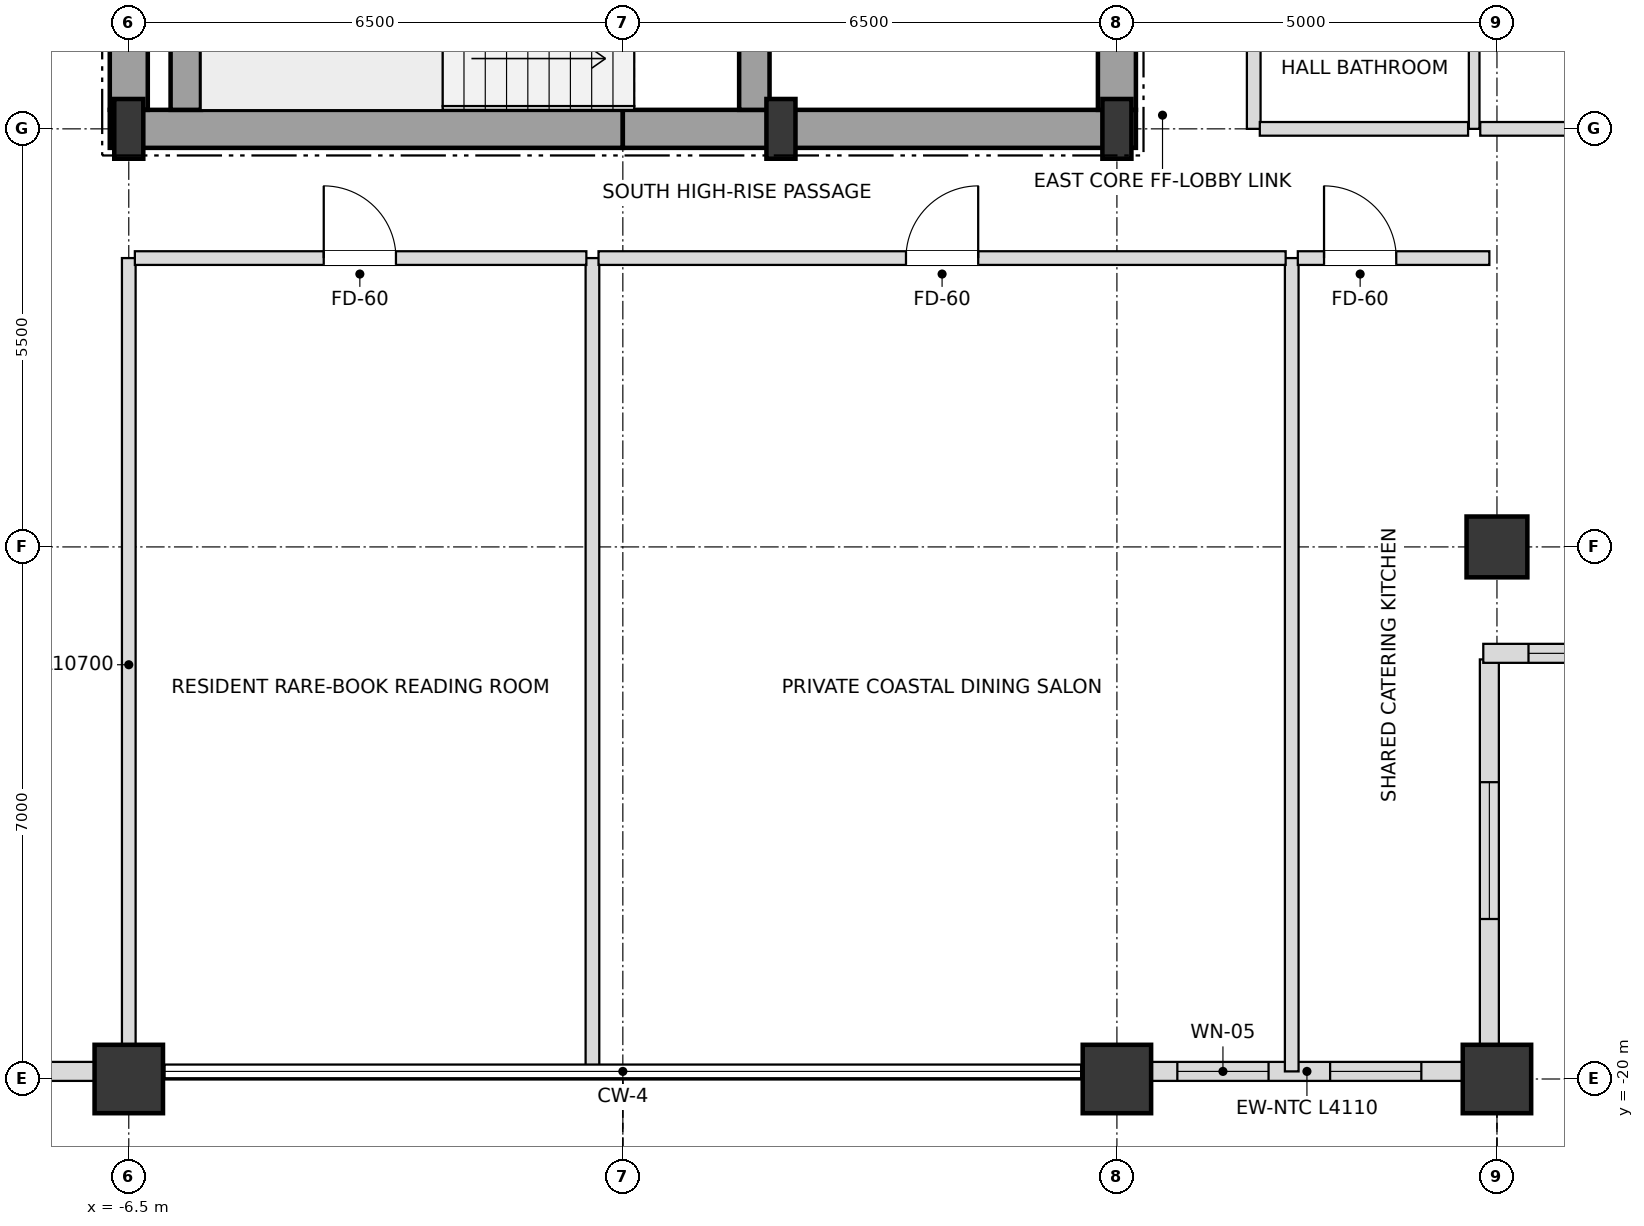
"""IFC4 building model, lengths in metres.
Left out: names, types, materials, properties, quantities, classifications, styles, units other than length and angle.
Written with IfcOpenShell. Run it as: python <this file> out.ifc"""

import sys

from ifc_helpers import new_model, si_unit, direction, frame, frame_2d, origin, origin_2d, place, context, subcontext, project, spatial, rectangle, i_section, extrude, element, fill, save


model = new_model("IFC4")
c1 = context("Model", 3, precision=1e-05, world=origin(), true_north=direction((0.0, 1.0)))
c2 = subcontext(c1, "Body", "Model", "MODEL_VIEW")
j1 = project(units=[si_unit("LENGTHUNIT", "METRE"), si_unit("PLANEANGLEUNIT", "RADIAN")], contexts=[c1])
p1 = place(None, origin())
s1 = spatial("IfcSite", under=j1, at=p1, CompositionType="ELEMENT")
p2 = place(p1, origin())
s2 = spatial("IfcBuilding", under=s1, at=p2, CompositionType="ELEMENT")
p3 = place(p2, frame((0.0, 0.0, 283.5)))
s3 = spatial("IfcBuildingStorey", under=s2, at=p3, CompositionType="ELEMENT", Elevation=283.5)
for number, where, z_axis, x_axis in (
    (1, (-6.5, -7.5, 0.0), (0.0, 0.0, 1.0), (1.0, 0.0, 0.0)),
    (2, (2.08, -7.5, 0.0), (0.0, 0.0, 1.0), (1.0, 0.0, 0.0)),
    (3, (6.5, -7.5, 0.0), (0.0, 0.0, 1.0), (1.0, 0.0, 0.0)),
):
    element("IfcColumn", number, at=place(p3, frame(where, z_axis=z_axis, x_axis=x_axis)), inside=s3, PredefinedType="COLUMN", context=c2, shape_type="SweptSolid", body=[
        extrude(i_section(OverallWidth=0.382, OverallDepth=0.786, WebThickness=0.02, FlangeThickness=0.033, at=origin_2d()), origin(), (0.0, 0.0, 1.0), 3.6),
    ])
for number, where, z_axis, x_axis in (
    (4, (-6.5, -20.0, 0.0), (0.0, 0.0, 1.0), (1.0, 0.0, 0.0)),
    (5, (6.5, -20.0, 0.0), (0.0, 0.0, 1.0), (1.0, 0.0, 0.0)),
    (6, (11.5, -20.0, 0.0), (0.0, 0.0, 1.0), (1.0, 0.0, 0.0)),
):
    element("IfcColumn", number, at=place(p3, frame(where, z_axis=z_axis, x_axis=x_axis)), inside=s3, PredefinedType="USERDEFINED", context=c2, shape_type="SweptSolid", body=[
        extrude(rectangle(XDim=0.9, YDim=0.9, at=origin_2d()), origin(), (0.0, 0.0, 1.0), 3.6),
    ])
p4 = place(p3, frame((11.5, -13.0, 0.0), z_axis=(0.0, 0.0, 1.0), x_axis=(1.0, 0.0, 0.0)))
e7 = element("IfcColumn", 7, at=p4, inside=s3, PredefinedType="COLUMN", context=c2, shape_type="SweptSolid", body=[
    extrude(rectangle(XDim=0.8, YDim=0.8, at=origin_2d()), origin(), (0.0, 0.0, 1.0), 3.6),
])
p5 = place(p3, frame((-11.055, -19.9, 0.0), z_axis=(0.0, 0.0, 1.0), x_axis=(1.0, 0.0, 0.0)))
e8 = element("IfcWall", 8, at=p5, inside=s3, PredefinedType="SOLIDWALL", context=c2, shape_type="SweptSolid", body=[
    extrude(rectangle(XDim=4.11, YDim=0.25, at=frame_2d((2.055, 0.0))), origin(), (0.0, 0.0, 1.0), 2.748),
])
p6 = place(p5, frame((1.155, 0.0, 0.72)))
e9 = element("IfcOpeningElement", 9, at=p6, cuts=e8, PredefinedType="OPENING", context=c2, shape_type="SweptSolid", body=[
    extrude(rectangle(XDim=1.8, YDim=1.68, at=frame_2d((0.9, 0.84))), frame((0.0, 0.135, 0.0), z_axis=(0.0, -1.0, 0.0), x_axis=(1.0, 0.0, 0.0)), (0.0, 0.0, 1.0), 0.27),
])
p7 = place(p3, frame((6.945, -19.9, 0.0), z_axis=(0.0, 0.0, 1.0), x_axis=(1.0, 0.0, 0.0)))
e10 = element("IfcWall", 10, at=p7, inside=s3, PredefinedType="SOLIDWALL", context=c2, shape_type="SweptSolid", body=[
    extrude(rectangle(XDim=4.11, YDim=0.25, at=frame_2d((2.055, 0.0))), origin(), (0.0, 0.0, 1.0), 2.748),
])
p8 = place(p7, frame((0.35, 0.0, 0.72)))
e11 = element("IfcOpeningElement", 11, at=p8, cuts=e10, PredefinedType="OPENING", context=c2, shape_type="SweptSolid", body=[
    extrude(rectangle(XDim=1.2, YDim=1.68, at=frame_2d((0.6, 0.84))), frame((0.0, 0.135, 0.0), z_axis=(0.0, -1.0, 0.0), x_axis=(1.0, 0.0, 0.0)), (0.0, 0.0, 1.0), 0.27),
])
p9 = place(p7, frame((2.36, 0.0, 0.72)))
e12 = element("IfcOpeningElement", 12, at=p9, cuts=e10, PredefinedType="OPENING", context=c2, shape_type="SweptSolid", body=[
    extrude(rectangle(XDim=1.2, YDim=1.68, at=frame_2d((0.6, 0.84))), frame((0.0, 0.135, 0.0), z_axis=(0.0, -1.0, 0.0), x_axis=(1.0, 0.0, 0.0)), (0.0, 0.0, 1.0), 0.27),
])
p10 = place(p3, frame((11.4, -19.82, 0.0), z_axis=(0.0, 0.0, 1.0), x_axis=(0.0, 1.0, 0.0)))
e13 = element("IfcWall", 13, at=p10, inside=s3, PredefinedType="SOLIDWALL", context=c2, shape_type="SweptSolid", body=[
    extrude(rectangle(XDim=5.34, YDim=0.25, at=frame_2d((2.67, 0.0))), origin(), (0.0, 0.0, 1.0), 2.748),
])
p11 = place(p10, frame((1.925, 0.0, 0.72)))
e14 = element("IfcOpeningElement", 14, at=p11, cuts=e13, PredefinedType="OPENING", context=c2, shape_type="SweptSolid", body=[
    extrude(rectangle(XDim=1.8, YDim=1.68, at=frame_2d((0.9, 0.84))), frame((0.0, 0.135, 0.0), z_axis=(0.0, -1.0, 0.0), x_axis=(1.0, 0.0, 0.0)), (0.0, 0.0, 1.0), 0.27),
])
p12 = place(p3, frame((11.32, -14.4, 0.0), z_axis=(0.0, 0.0, 1.0), x_axis=(1.0, 0.0, 0.0)))
e15 = element("IfcWall", 15, at=p12, inside=s3, PredefinedType="SOLIDWALL", context=c2, shape_type="SweptSolid", body=[
    extrude(rectangle(XDim=5.66, YDim=0.25, at=frame_2d((2.83, 0.0))), origin(), (0.0, 0.0, 1.0), 2.748),
])
p13 = place(p12, frame((0.595, 0.0, 0.72)))
e16 = element("IfcOpeningElement", 16, at=p13, cuts=e15, PredefinedType="OPENING", context=c2, shape_type="SweptSolid", body=[
    extrude(rectangle(XDim=1.8, YDim=1.68, at=frame_2d((0.9, 0.84))), frame((0.0, 0.135, 0.0), z_axis=(0.0, -1.0, 0.0), x_axis=(1.0, 0.0, 0.0)), (0.0, 0.0, 1.0), 0.27),
])
p14 = place(p12, frame((3.265, 0.0, 0.72)))
e17 = element("IfcOpeningElement", 17, at=p14, cuts=e15, PredefinedType="OPENING", context=c2, shape_type="SweptSolid", body=[
    extrude(rectangle(XDim=1.8, YDim=1.68, at=frame_2d((0.9, 0.84))), frame((0.0, 0.135, 0.0), z_axis=(0.0, -1.0, 0.0), x_axis=(1.0, 0.0, 0.0)), (0.0, 0.0, 1.0), 0.27),
])
for number, where, z_axis, x_axis in (
    (18, (-6.75, -7.5, 0.0), (0.0, 0.0, 1.0), (1.0, 0.0, 0.0)),
    (19, (0.0, -7.5, 0.0), (0.0, 0.0, 1.0), (1.0, 0.0, 0.0)),
):
    element("IfcWall", number, at=place(p3, frame(where, z_axis=z_axis, x_axis=x_axis)), inside=s3, PredefinedType="SHEAR", context=c2, shape_type="SweptSolid", body=[
        extrude(rectangle(XDim=6.75, YDim=0.5, at=frame_2d((3.375, 0.0))), origin(), (0.0, 0.0, 1.0), 3.38),
    ])
p15 = place(p3, frame((-6.5, -7.25, 0.0), z_axis=(0.0, 0.0, 1.0), x_axis=(0.0, 1.0, 0.0)))
e20 = element("IfcWall", 20, at=p15, inside=s3, PredefinedType="SHEAR", context=c2, shape_type="SweptSolid", body=[
    extrude(rectangle(XDim=3.55, YDim=0.5, at=frame_2d((1.775, 0.0))), origin(), (0.0, 0.0, 1.0), 3.38),
])
p16 = place(p3, frame((6.5, -7.25, 0.0), z_axis=(0.0, 0.0, 1.0), x_axis=(0.0, 1.0, 0.0)))
e21 = element("IfcWall", 21, at=p16, inside=s3, PredefinedType="SHEAR", context=c2, shape_type="SweptSolid", body=[
    extrude(rectangle(XDim=5.75, YDim=0.5, at=frame_2d((2.875, 0.0))), origin(), (0.0, 0.0, 1.0), 3.38),
])
p17 = place(p16, frame((0.85, 0.0, 0.0)))
e22 = element("IfcOpeningElement", 22, at=p17, cuts=e21, PredefinedType="OPENING", context=c2, shape_type="SweptSolid", body=[
    extrude(rectangle(XDim=1.05, YDim=2.15, at=frame_2d((0.525, 1.075))), frame((0.0, 0.26, 0.0), z_axis=(0.0, -1.0, 0.0), x_axis=(1.0, 0.0, 0.0)), (0.0, 0.0, 1.0), 0.52),
])
p18 = place(p3, frame((-5.75, -7.25, 0.0), z_axis=(0.0, 0.0, 1.0), x_axis=(0.0, 1.0, 0.0)))
e23 = element("IfcWall", 23, at=p18, inside=s3, PredefinedType="SHEAR", context=c2, shape_type="SweptSolid", body=[
    extrude(rectangle(XDim=2.9, YDim=0.4, at=frame_2d((1.45, 0.0))), origin(), (0.0, 0.0, 1.0), 3.38),
])
p19 = place(p3, frame((1.73, -7.25, 0.0), z_axis=(0.0, 0.0, 1.0), x_axis=(0.0, 1.0, 0.0)))
e24 = element("IfcWall", 24, at=p19, inside=s3, PredefinedType="SHEAR", context=c2, shape_type="SweptSolid", body=[
    extrude(rectangle(XDim=3.3, YDim=0.4, at=frame_2d((1.65, 0.0))), origin(), (0.0, 0.0, 1.0), 3.38),
])
p20 = place(p19, frame((0.9, 0.0, 0.0)))
e25 = element("IfcOpeningElement", 25, at=p20, cuts=e24, PredefinedType="OPENING", context=c2, shape_type="SweptSolid", body=[
    extrude(rectangle(XDim=1.05, YDim=2.15, at=frame_2d((0.525, 1.075))), frame((0.0, 0.21, 0.0), z_axis=(0.0, -1.0, 0.0), x_axis=(1.0, 0.0, 0.0)), (0.0, 0.0, 1.0), 0.42),
])
p21 = place(p3, frame((-6.5, -19.9, 0.0), z_axis=(0.0, 0.0, 1.0), x_axis=(0.0, 1.0, 0.0)))
e26 = element("IfcWall", 26, at=p21, inside=s3, PredefinedType="PARTITIONING", context=c2, shape_type="SweptSolid", body=[
    extrude(rectangle(XDim=10.7, YDim=0.18, at=frame_2d((5.35, 0.0))), origin(), (0.0, 0.0, 1.0), 2.826),
])
p22 = place(p3, frame((-0.4, -19.9, 0.0), z_axis=(0.0, 0.0, 1.0), x_axis=(0.0, 1.0, 0.0)))
e27 = element("IfcWall", 27, at=p22, inside=s3, PredefinedType="PARTITIONING", context=c2, shape_type="SweptSolid", body=[
    extrude(rectangle(XDim=10.7, YDim=0.18, at=frame_2d((5.35, 0.0))), origin(), (0.0, 0.0, 1.0), 3.018),
])
p23 = place(p3, frame((8.3, -7.5, 0.0), z_axis=(0.0, 0.0, 1.0), x_axis=(0.0, 1.0, 0.0)))
e28 = element("IfcWall", 28, at=p23, inside=s3, PredefinedType="PARTITIONING", context=c2, shape_type="SweptSolid", body=[
    extrude(rectangle(XDim=15.0, YDim=0.18, at=frame_2d((7.5, 0.0))), origin(), (0.0, 0.0, 1.0), 3.38),
])
p24 = place(p23, frame((2.355, 0.0, 0.0)))
e29 = element("IfcOpeningElement", 29, at=p24, cuts=e28, PredefinedType="OPENING", context=c2, shape_type="SweptSolid", body=[
    extrude(rectangle(XDim=0.95, YDim=2.15, at=frame_2d((0.475, 1.075))), frame((0.0, 0.1, 0.0), z_axis=(0.0, -1.0, 0.0), x_axis=(1.0, 0.0, 0.0)), (0.0, 0.0, 1.0), 0.2),
])
p25 = place(p3, frame((8.8, -19.9, 0.0), z_axis=(0.0, 0.0, 1.0), x_axis=(0.0, 1.0, 0.0)))
e30 = element("IfcWall", 30, at=p25, inside=s3, PredefinedType="PARTITIONING", context=c2, shape_type="SweptSolid", body=[
    extrude(rectangle(XDim=10.7, YDim=0.18, at=frame_2d((5.35, 0.0))), origin(), (0.0, 0.0, 1.0), 2.826),
])
p26 = place(p3, frame((11.2, -7.5, 0.0), z_axis=(0.0, 0.0, 1.0), x_axis=(0.0, 1.0, 0.0)))
e31 = element("IfcWall", 31, at=p26, inside=s3, PredefinedType="PARTITIONING", context=c2, shape_type="SweptSolid", body=[
    extrude(rectangle(XDim=15.0, YDim=0.14, at=frame_2d((7.5, 0.0))), origin(), (0.0, 0.0, 1.0), 3.38),
])
p27 = place(p26, frame((3.475, 0.0, 0.0)))
e32 = element("IfcOpeningElement", 32, at=p27, cuts=e31, PredefinedType="OPENING", context=c2, shape_type="SweptSolid", body=[
    extrude(rectangle(XDim=0.95, YDim=2.1, at=frame_2d((0.475, 1.05))), frame((0.0, 0.08, 0.0), z_axis=(0.0, -1.0, 0.0), x_axis=(1.0, 0.0, 0.0)), (0.0, 0.0, 1.0), 0.16),
])
p28 = place(p3, frame((-6.42, -9.2, 0.0), z_axis=(0.0, 0.0, 1.0), x_axis=(1.0, 0.0, 0.0)))
e33 = element("IfcWall", 33, at=p28, inside=s3, PredefinedType="PARTITIONING", context=c2, shape_type="SweptSolid", body=[
    extrude(rectangle(XDim=5.94, YDim=0.18, at=frame_2d((2.97, 0.0))), origin(), (0.0, 0.0, 1.0), 3.38),
])
p29 = place(p28, frame((2.485, 0.0, 0.0)))
e34 = element("IfcOpeningElement", 34, at=p29, cuts=e33, PredefinedType="OPENING", context=c2, shape_type="SweptSolid", body=[
    extrude(rectangle(XDim=0.95, YDim=2.15, at=frame_2d((0.475, 1.075))), frame((0.0, 0.1, 0.0), z_axis=(0.0, -1.0, 0.0), x_axis=(1.0, 0.0, 0.0)), (0.0, 0.0, 1.0), 0.2),
])
p30 = place(p3, frame((-0.32, -9.2, 0.0), z_axis=(0.0, 0.0, 1.0), x_axis=(1.0, 0.0, 0.0)))
e35 = element("IfcWall", 35, at=p30, inside=s3, PredefinedType="PARTITIONING", context=c2, shape_type="SweptSolid", body=[
    extrude(rectangle(XDim=9.04, YDim=0.18, at=frame_2d((4.52, 0.0))), origin(), (0.0, 0.0, 1.0), 2.826),
])
p31 = place(p30, frame((4.045, 0.0, 0.0)))
e36 = element("IfcOpeningElement", 36, at=p31, cuts=e35, PredefinedType="OPENING", context=c2, shape_type="SweptSolid", body=[
    extrude(rectangle(XDim=0.95, YDim=2.15, at=frame_2d((0.475, 1.075))), frame((0.0, 0.1, 0.0), z_axis=(0.0, -1.0, 0.0), x_axis=(1.0, 0.0, 0.0)), (0.0, 0.0, 1.0), 0.2),
])
p32 = place(p3, frame((8.88, -9.2, 0.0), z_axis=(0.0, 0.0, 1.0), x_axis=(1.0, 0.0, 0.0)))
e37 = element("IfcWall", 37, at=p32, inside=s3, PredefinedType="PARTITIONING", context=c2, shape_type="SweptSolid", body=[
    extrude(rectangle(XDim=2.52, YDim=0.18, at=frame_2d((1.26, 0.0))), origin(), (0.0, 0.0, 1.0), 3.38),
])
p33 = place(p32, frame((0.345, 0.0, 0.0)))
e38 = element("IfcOpeningElement", 38, at=p33, cuts=e37, PredefinedType="OPENING", context=c2, shape_type="SweptSolid", body=[
    extrude(rectangle(XDim=0.95, YDim=2.15, at=frame_2d((0.475, 1.075))), frame((0.0, 0.1, 0.0), z_axis=(0.0, -1.0, 0.0), x_axis=(1.0, 0.0, 0.0)), (0.0, 0.0, 1.0), 0.2),
])
p34 = place(p3, frame((8.38, -7.5, 0.0), z_axis=(0.0, 0.0, 1.0), x_axis=(1.0, 0.0, 0.0)))
e39 = element("IfcWall", 39, at=p34, inside=s3, PredefinedType="PARTITIONING", context=c2, shape_type="SweptSolid", body=[
    extrude(rectangle(XDim=2.74, YDim=0.18, at=frame_2d((1.37, 0.0))), origin(), (0.0, 0.0, 1.0), 2.826),
])
p35 = place(p3, frame((11.28, -7.5, 0.0), z_axis=(0.0, 0.0, 1.0), x_axis=(1.0, 0.0, 0.0)))
e40 = element("IfcWall", 40, at=p35, inside=s3, PredefinedType="PARTITIONING", context=c2, shape_type="SweptSolid", body=[
    extrude(rectangle(XDim=5.62, YDim=0.18, at=frame_2d((2.81, 0.0))), origin(), (0.0, 0.0, 1.0), 2.826),
])
p36 = place(p8, origin())
e41 = element("IfcWindow", 41, at=p36, inside=s3, PartitioningType="SINGLE_PANEL", PredefinedType="WINDOW", context=c2, shape_type="SweptSolid", body=[
    extrude(rectangle(XDim=1.2, YDim=1.68, at=frame_2d((0.6, 0.84))), frame((0.0, 0.03, 0.0), z_axis=(0.0, -1.0, 0.0), x_axis=(1.0, 0.0, 0.0)), (0.0, 0.0, 1.0), 0.06),
])
fill(e11, e41)
p37 = place(p9, origin())
e42 = element("IfcWindow", 42, at=p37, inside=s3, PartitioningType="SINGLE_PANEL", PredefinedType="WINDOW", context=c2, shape_type="SweptSolid", body=[
    extrude(rectangle(XDim=1.2, YDim=1.68, at=frame_2d((0.6, 0.84))), frame((0.0, 0.03, 0.0), z_axis=(0.0, -1.0, 0.0), x_axis=(1.0, 0.0, 0.0)), (0.0, 0.0, 1.0), 0.06),
])
fill(e12, e42)
p38 = place(p11, origin())
e43 = element("IfcWindow", 43, at=p38, inside=s3, PartitioningType="SINGLE_PANEL", PredefinedType="WINDOW", context=c2, shape_type="SweptSolid", body=[
    extrude(rectangle(XDim=1.8, YDim=1.68, at=frame_2d((0.9, 0.84))), frame((0.0, 0.03, 0.0), z_axis=(0.0, -1.0, 0.0), x_axis=(1.0, 0.0, 0.0)), (0.0, 0.0, 1.0), 0.06),
])
fill(e14, e43)
p39 = place(p13, origin())
e44 = element("IfcWindow", 44, at=p39, inside=s3, PartitioningType="SINGLE_PANEL", PredefinedType="WINDOW", context=c2, shape_type="SweptSolid", body=[
    extrude(rectangle(XDim=1.8, YDim=1.68, at=frame_2d((0.9, 0.84))), frame((0.0, 0.03, 0.0), z_axis=(0.0, -1.0, 0.0), x_axis=(1.0, 0.0, 0.0)), (0.0, 0.0, 1.0), 0.06),
])
fill(e16, e44)
p40 = place(p29, origin())
e45 = element("IfcDoor", 45, at=p40, inside=s3, OperationType="SINGLE_SWING_LEFT", PredefinedType="DOOR", context=c2, shape_type="SweptSolid", body=[
    extrude(rectangle(XDim=0.95, YDim=2.15, at=frame_2d((0.475, 1.075))), frame((0.0, 0.025, 0.0), z_axis=(0.0, -1.0, 0.0), x_axis=(1.0, 0.0, 0.0)), (0.0, 0.0, 1.0), 0.05),
])
fill(e34, e45)
p41 = place(p31, origin())
e46 = element("IfcDoor", 46, at=p41, inside=s3, OperationType="SINGLE_SWING_RIGHT", PredefinedType="DOOR", context=c2, shape_type="SweptSolid", body=[
    extrude(rectangle(XDim=0.95, YDim=2.15, at=frame_2d((0.475, 1.075))), frame((0.0, 0.025, 0.0), z_axis=(0.0, -1.0, 0.0), x_axis=(1.0, 0.0, 0.0)), (0.0, 0.0, 1.0), 0.05),
])
fill(e36, e46)
p42 = place(p33, origin())
e47 = element("IfcDoor", 47, at=p42, inside=s3, OperationType="SINGLE_SWING_LEFT", PredefinedType="DOOR", context=c2, shape_type="SweptSolid", body=[
    extrude(rectangle(XDim=0.95, YDim=2.15, at=frame_2d((0.475, 1.075))), frame((0.0, 0.025, 0.0), z_axis=(0.0, -1.0, 0.0), x_axis=(1.0, 0.0, 0.0)), (0.0, 0.0, 1.0), 0.05),
])
fill(e38, e47)
save(model, sys.argv[1])
